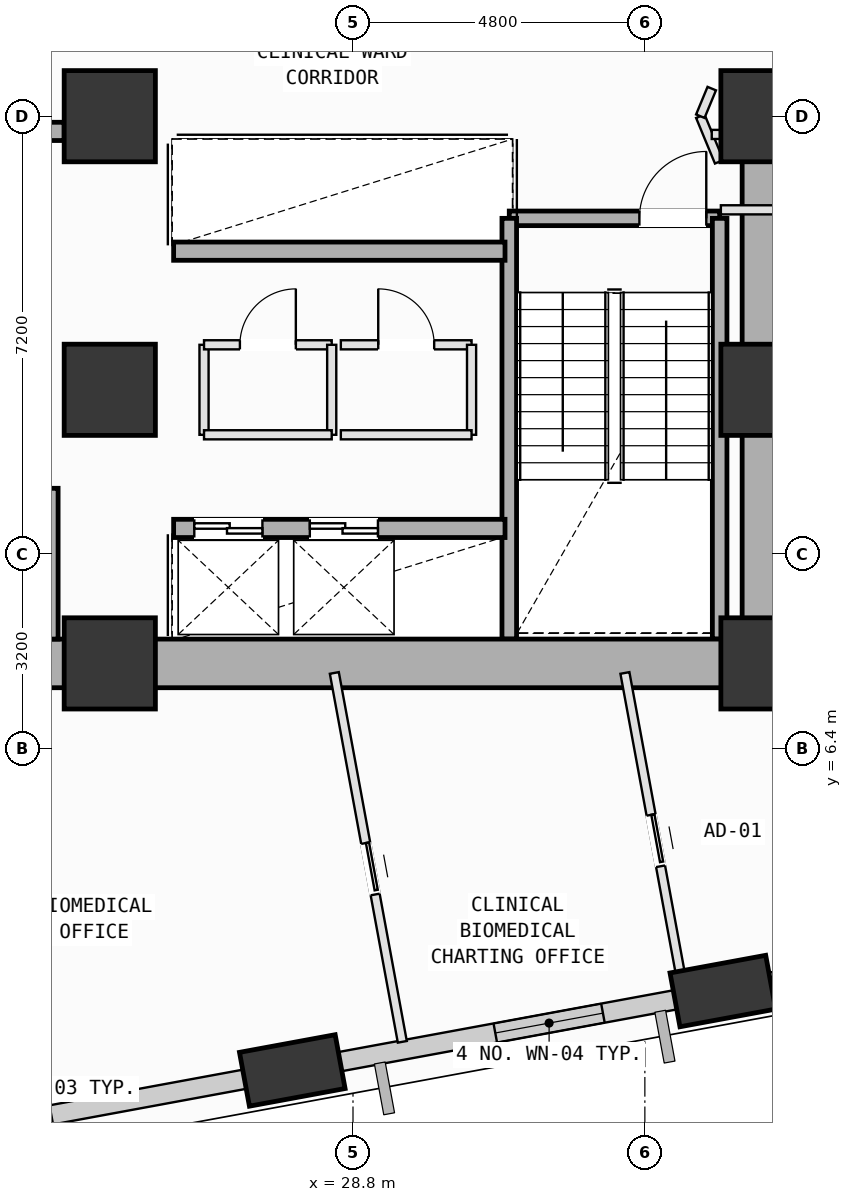
"""IFC4 building model, lengths in metres.
Left out: names, types, materials, properties, quantities, classifications, styles, units other than length and angle.
Written with IfcOpenShell. Run it as: python <this file> out.ifc"""

import sys

from ifc_helpers import new_model, si_unit, direction, frame, frame_2d, origin, origin_2d, place, context, subcontext, project, spatial, rectangle, extrude, element, fill, save


model = new_model("IFC4")
c1 = context("Model", 3, precision=1e-05, world=origin(), true_north=direction((0.0, 1.0)))
c2 = subcontext(c1, "Body", "Model", "MODEL_VIEW")
j1 = project(units=[si_unit("LENGTHUNIT", "METRE"), si_unit("PLANEANGLEUNIT", "RADIAN")], contexts=[c1])
p1 = place(None, origin())
s1 = spatial("IfcSite", under=j1, at=p1, CompositionType="ELEMENT")
p2 = place(p1, origin())
s2 = spatial("IfcBuilding", under=s1, at=p2, CompositionType="ELEMENT")
p3 = place(p2, frame((0.0, 0.0, 67.0)))
s3 = spatial("IfcBuildingStorey", under=s2, at=p3, CompositionType="ELEMENT", Elevation=67.0)
for number, where, z_axis, x_axis in (
    (1, (24.8, 7.8, 0.0), (0.0, 0.0, 1.0), (1.0, 0.0, 0.0)),
    (2, (24.8, 12.3, 0.0), (0.0, 0.0, 1.0), (1.0, 0.0, 0.0)),
    (3, (24.8, 16.8, 0.0), (0.0, 0.0, 1.0), (1.0, 0.0, 0.0)),
    (4, (35.6, 7.8, 0.0), (0.0, 0.0, 1.0), (1.0, 0.0, 0.0)),
    (5, (35.6, 12.3, 0.0), (0.0, 0.0, 1.0), (1.0, 0.0, 0.0)),
    (6, (35.6, 16.8, 0.0), (0.0, 0.0, 1.0), (1.0, 0.0, 0.0)),
):
    element("IfcColumn", number, at=place(p3, frame(where, z_axis=z_axis, x_axis=x_axis)), inside=s3, PredefinedType="COLUMN", context=c2, shape_type="SweptSolid", body=[
        extrude(rectangle(XDim=1.5, YDim=1.5, at=origin_2d()), origin(), (0.0, 0.0, 1.0), 4.0),
    ])
p4 = place(p3, frame((27.802, 1.105, 0.002), z_axis=(0.097912486594, -0.023095434454, 0.994927005301), x_axis=(0.0501328935, 0.998575865555, 0.018246471441)))
e7 = element("IfcColumn", 7, at=p4, inside=s3, PredefinedType="COLUMN", context=c2, shape_type="SweptSolid", body=[
    extrude(rectangle(XDim=1.6, YDim=0.9, at=origin_2d()), origin(), (0.0, 0.0, 1.0), 4.017),
])
p5 = place(p3, frame((34.882, 2.411, 0.002), z_axis=(0.092332756055, 0.006082526749, 0.995709628872), x_axis=(-0.244852017256, 0.969415188648, 0.016783374669)))
e8 = element("IfcColumn", 8, at=p5, inside=s3, PredefinedType="COLUMN", context=c2, shape_type="SweptSolid", body=[
    extrude(rectangle(XDim=1.6, YDim=0.9, at=origin_2d()), origin(), (0.0, 0.0, 1.0), 4.014),
])
p6 = place(p3, frame((27.391, 1.03, 0.0), z_axis=(0.0, 0.0, 1.0), x_axis=(-0.983411421396, -0.18138901915, 0.0)))
e9 = element("IfcWall", 9, at=p6, inside=s3, PredefinedType="SOLIDWALL", context=c2, shape_type="SweptSolid", body=[
    extrude(rectangle(XDim=6.006, YDim=0.32, at=frame_2d((3.003, 0.0))), origin(), (0.0, 0.0, 1.0), 3.165),
])
p7 = place(p6, frame((3.613, 0.0, 0.75)))
e10 = element("IfcOpeningElement", 10, at=p7, cuts=e9, PredefinedType="OPENING", context=c2, shape_type="SweptSolid", body=[
    extrude(rectangle(XDim=1.4, YDim=1.85, at=frame_2d((0.7, 0.925))), frame((0.0, 0.17, 0.0), z_axis=(0.0, -1.0, 0.0), x_axis=(1.0, 0.0, 0.0)), (0.0, 0.0, 1.0), 0.34),
])
p8 = place(p3, frame((34.466, 2.334, 0.0), z_axis=(0.0, 0.0, 1.0), x_axis=(-0.983412841191, -0.181381321478, 0.0)))
e11 = element("IfcWall", 11, at=p8, inside=s3, PredefinedType="SOLIDWALL", context=c2, shape_type="SweptSolid", body=[
    extrude(rectangle(XDim=5.99, YDim=0.32, at=frame_2d((2.995, 0.0))), origin(), (0.0, 0.0, 1.0), 3.165),
])
p9 = place(p8, frame((1.582, 0.0, 0.75)))
e12 = element("IfcOpeningElement", 12, at=p9, cuts=e11, PredefinedType="OPENING", context=c2, shape_type="SweptSolid", body=[
    extrude(rectangle(XDim=1.8, YDim=2.05, at=frame_2d((0.9, 1.025))), frame((0.0, 0.17, 0.0), z_axis=(0.0, -1.0, 0.0), x_axis=(1.0, 0.0, 0.0)), (0.0, 0.0, 1.0), 0.34),
])
p10 = place(p3, frame((41.547, 3.64, 0.0), z_axis=(0.0, 0.0, 1.0), x_axis=(-0.983417788938, -0.181354493742, 0.0)))
e13 = element("IfcWall", 13, at=p10, inside=s3, PredefinedType="SOLIDWALL", context=c2, shape_type="SweptSolid", body=[
    extrude(rectangle(XDim=5.985, YDim=0.32, at=frame_2d((2.993, 0.0))), origin(), (0.0, 0.0, 1.0), 3.165),
])
p11 = place(p10, frame((3.854, 0.0, 0.75)))
e14 = element("IfcOpeningElement", 14, at=p11, cuts=e13, PredefinedType="OPENING", context=c2, shape_type="SweptSolid", body=[
    extrude(rectangle(XDim=1.2, YDim=1.75, at=frame_2d((0.6, 0.875))), frame((0.0, 0.17, 0.0), z_axis=(0.0, -1.0, 0.0), x_axis=(1.0, 0.0, 0.0)), (0.0, 0.0, 1.0), 0.34),
])
p12 = place(p3, frame((31.37, 15.12, 0.0), z_axis=(0.0, 0.0, 1.0), x_axis=(1.0, 0.0, 0.0)))
e15 = element("IfcWall", 15, at=p12, inside=s3, PredefinedType="SOLIDWALL", context=c2, shape_type="SweptSolid", body=[
    extrude(rectangle(XDim=3.46, YDim=0.24, at=frame_2d((1.73, 0.0))), origin(), (0.0, 0.0, 1.0), 3.78),
])
p13 = place(p12, frame((2.14, 0.0, 0.0)))
e16 = element("IfcOpeningElement", 16, at=p13, cuts=e15, PredefinedType="OPENING", context=c2, shape_type="SweptSolid", body=[
    extrude(rectangle(XDim=1.1, YDim=2.15, at=frame_2d((0.55, 1.075))), frame((0.0, 0.13, 0.0), z_axis=(0.0, -1.0, 0.0), x_axis=(1.0, 0.0, 0.0)), (0.0, 0.0, 1.0), 0.26),
])
for number, where, z_axis, x_axis in (
    (17, (34.83, 15.12, 0.0), (0.0, 0.0, 1.0), (0.0, -1.0, 0.0)),
    (18, (31.37, 8.2, 0.0), (0.0, 0.0, 1.0), (0.0, 1.0, 0.0)),
):
    element("IfcWall", number, at=place(p3, frame(where, z_axis=z_axis, x_axis=x_axis)), inside=s3, PredefinedType="SOLIDWALL", context=c2, shape_type="SweptSolid", body=[
        extrude(rectangle(XDim=6.92, YDim=0.24, at=frame_2d((3.46, 0.0))), origin(), (0.0, 0.0, 1.0), 3.78),
    ])
for number, where, z_axis, x_axis in (
    (19, (14.0, 7.8, 0.0), (0.0, 0.0, 1.0), (1.0, 0.0, 0.0)),
    (20, (24.8, 7.8, 0.0), (0.0, 0.0, 1.0), (1.0, 0.0, 0.0)),
):
    element("IfcWall", number, at=place(p3, frame(where, z_axis=z_axis, x_axis=x_axis)), inside=s3, PredefinedType="SHEAR", context=c2, shape_type="SweptSolid", body=[
        extrude(rectangle(XDim=10.8, YDim=0.8, at=frame_2d((5.4, 0.0))), origin(), (0.0, 0.0, 1.0), 3.78),
    ])
p14 = place(p3, frame((35.6, 7.8, 0.0), z_axis=(0.0, 0.0, 1.0), x_axis=(0.0, 1.0, 0.0)))
e21 = element("IfcWall", 21, at=p14, inside=s3, PredefinedType="SHEAR", context=c2, shape_type="SweptSolid", body=[
    extrude(rectangle(XDim=9.0, YDim=0.8, at=frame_2d((4.5, 0.0))), origin(), (0.0, 0.0, 1.0), 3.78),
])
p15 = place(p3, frame((19.85, 16.55, 0.0), z_axis=(0.0, 0.0, 1.0), x_axis=(1.0, 0.0, 0.0)))
e22 = element("IfcWall", 22, at=p15, inside=s3, PredefinedType="SOLIDWALL", context=c2, shape_type="SweptSolid", body=[
    extrude(rectangle(XDim=4.2, YDim=0.3, at=frame_2d((2.1, 0.0))), origin(), (0.0, 0.0, 1.0), 3.78),
])
p16 = place(p15, frame((0.475, 0.0, 0.0)))
e23 = element("IfcOpeningElement", 23, at=p16, cuts=e22, PredefinedType="OPENING", context=c2, shape_type="SweptSolid", body=[
    extrude(rectangle(XDim=1.25, YDim=2.18, at=frame_2d((0.625, 1.09))), frame((0.0, 0.16, 0.0), z_axis=(0.0, -1.0, 0.0), x_axis=(1.0, 0.0, 0.0)), (0.0, 0.0, 1.0), 0.32),
])
p17 = place(p15, frame((2.49, 0.0, 0.0)))
e24 = element("IfcOpeningElement", 24, at=p17, cuts=e22, PredefinedType="OPENING", context=c2, shape_type="SweptSolid", body=[
    extrude(rectangle(XDim=1.02, YDim=2.12, at=frame_2d((0.51, 1.06))), frame((0.0, 0.16, 0.0), z_axis=(0.0, -1.0, 0.0), x_axis=(1.0, 0.0, 0.0)), (0.0, 0.0, 1.0), 0.32),
])
p18 = place(p3, frame((23.8, 8.2, 0.0), z_axis=(0.0, 0.0, 1.0), x_axis=(0.0, 1.0, 0.0)))
e25 = element("IfcWall", 25, at=p18, inside=s3, PredefinedType="SOLIDWALL", context=c2, shape_type="SweptSolid", body=[
    extrude(rectangle(XDim=2.48, YDim=0.3, at=frame_2d((1.24, 0.0))), origin(), (0.0, 0.0, 1.0), 3.78),
])
p19 = place(p3, frame((25.85, 10.02, 0.0), z_axis=(0.0, 0.0, 1.0), x_axis=(1.0, 0.0, 0.0)))
e26 = element("IfcWall", 26, at=p19, inside=s3, PredefinedType="SOLIDWALL", context=c2, shape_type="SweptSolid", body=[
    extrude(rectangle(XDim=5.45, YDim=0.3, at=frame_2d((2.725, 0.0))), origin(), (0.0, 0.0, 1.0), 3.78),
])
p20 = place(p19, frame((0.34, 0.0, 0.0)))
e27 = element("IfcOpeningElement", 27, at=p20, cuts=e26, PredefinedType="OPENING", context=c2, shape_type="SweptSolid", body=[
    extrude(rectangle(XDim=1.12, YDim=2.15, at=frame_2d((0.56, 1.075))), frame((0.0, 0.16, 0.0), z_axis=(0.0, -1.0, 0.0), x_axis=(1.0, 0.0, 0.0)), (0.0, 0.0, 1.0), 0.32),
])
p21 = place(p19, frame((2.24, 0.0, 0.0)))
e28 = element("IfcOpeningElement", 28, at=p21, cuts=e26, PredefinedType="OPENING", context=c2, shape_type="SweptSolid", body=[
    extrude(rectangle(XDim=1.12, YDim=2.15, at=frame_2d((0.56, 1.075))), frame((0.0, 0.16, 0.0), z_axis=(0.0, -1.0, 0.0), x_axis=(1.0, 0.0, 0.0)), (0.0, 0.0, 1.0), 0.32),
])
p22 = place(p3, frame((25.85, 14.58, 0.0), z_axis=(0.0, 0.0, 1.0), x_axis=(1.0, 0.0, 0.0)))
e29 = element("IfcWall", 29, at=p22, inside=s3, PredefinedType="SOLIDWALL", context=c2, shape_type="SweptSolid", body=[
    extrude(rectangle(XDim=5.45, YDim=0.3, at=frame_2d((2.725, 0.0))), origin(), (0.0, 0.0, 1.0), 3.78),
])
p23 = place(p3, frame((26.35, 11.56, 0.0), z_axis=(0.0, 0.0, 1.0), x_axis=(0.0, 1.0, 0.0)))
e30 = element("IfcWall", 30, at=p23, inside=s3, PredefinedType="PARTITIONING", context=c2, shape_type="SweptSolid", body=[
    extrude(rectangle(XDim=1.48, YDim=0.15, at=frame_2d((0.74, 0.0))), origin(), (0.0, 0.0, 1.0), 3.78),
])
p24 = place(p3, frame((26.35, 13.04, 0.0), z_axis=(0.0, 0.0, 1.0), x_axis=(1.0, 0.0, 0.0)))
e31 = element("IfcWall", 31, at=p24, inside=s3, PredefinedType="PARTITIONING", context=c2, shape_type="SweptSolid", body=[
    extrude(rectangle(XDim=2.1, YDim=0.15, at=frame_2d((1.05, 0.0))), origin(), (0.0, 0.0, 1.0), 3.78),
])
p25 = place(p24, frame((0.59, 0.0, 0.0)))
e32 = element("IfcOpeningElement", 32, at=p25, cuts=e31, PredefinedType="OPENING", context=c2, shape_type="SweptSolid", body=[
    extrude(rectangle(XDim=0.92, YDim=2.1, at=frame_2d((0.46, 1.05))), frame((0.0, 0.085, 0.0), z_axis=(0.0, -1.0, 0.0), x_axis=(1.0, 0.0, 0.0)), (0.0, 0.0, 1.0), 0.17),
])
p26 = place(p3, frame((28.45, 13.04, 0.0), z_axis=(0.0, 0.0, 1.0), x_axis=(0.0, -1.0, 0.0)))
e33 = element("IfcWall", 33, at=p26, inside=s3, PredefinedType="PARTITIONING", context=c2, shape_type="SweptSolid", body=[
    extrude(rectangle(XDim=1.48, YDim=0.15, at=frame_2d((0.74, 0.0))), origin(), (0.0, 0.0, 1.0), 3.78),
])
p27 = place(p3, frame((28.45, 11.56, 0.0), z_axis=(0.0, 0.0, 1.0), x_axis=(-1.0, 0.0, 0.0)))
e34 = element("IfcWall", 34, at=p27, inside=s3, PredefinedType="PARTITIONING", context=c2, shape_type="SweptSolid", body=[
    extrude(rectangle(XDim=2.1, YDim=0.15, at=frame_2d((1.05, 0.0))), origin(), (0.0, 0.0, 1.0), 3.78),
])
p28 = place(p3, frame((28.6, 13.04, 0.0), z_axis=(0.0, 0.0, 1.0), x_axis=(1.0, 0.0, 0.0)))
e35 = element("IfcWall", 35, at=p28, inside=s3, PredefinedType="PARTITIONING", context=c2, shape_type="SweptSolid", body=[
    extrude(rectangle(XDim=2.15, YDim=0.15, at=frame_2d((1.075, 0.0))), origin(), (0.0, 0.0, 1.0), 3.78),
])
p29 = place(p28, frame((0.615, 0.0, 0.0)))
e36 = element("IfcOpeningElement", 36, at=p29, cuts=e35, PredefinedType="OPENING", context=c2, shape_type="SweptSolid", body=[
    extrude(rectangle(XDim=0.92, YDim=2.1, at=frame_2d((0.46, 1.05))), frame((0.0, 0.085, 0.0), z_axis=(0.0, -1.0, 0.0), x_axis=(1.0, 0.0, 0.0)), (0.0, 0.0, 1.0), 0.17),
])
p30 = place(p3, frame((30.75, 13.04, 0.0), z_axis=(0.0, 0.0, 1.0), x_axis=(0.0, -1.0, 0.0)))
e37 = element("IfcWall", 37, at=p30, inside=s3, PredefinedType="PARTITIONING", context=c2, shape_type="SweptSolid", body=[
    extrude(rectangle(XDim=1.48, YDim=0.15, at=frame_2d((0.74, 0.0))), origin(), (0.0, 0.0, 1.0), 3.78),
])
p31 = place(p3, frame((30.75, 11.56, 0.0), z_axis=(0.0, 0.0, 1.0), x_axis=(-1.0, 0.0, 0.0)))
e38 = element("IfcWall", 38, at=p31, inside=s3, PredefinedType="PARTITIONING", context=c2, shape_type="SweptSolid", body=[
    extrude(rectangle(XDim=2.15, YDim=0.15, at=frame_2d((1.075, 0.0))), origin(), (0.0, 0.0, 1.0), 3.78),
])
p32 = place(p3, frame((28.618, 1.022, 0.0), z_axis=(0.0, 0.0, 1.0), x_axis=(-0.983343757315, -0.18175548121, 0.0)))
e39 = element("IfcWall", 39, at=p32, inside=s3, PredefinedType="PARTITIONING", context=c2, shape_type="SweptSolid", body=[
    extrude(rectangle(XDim=1.205, YDim=0.15, at=frame_2d((0.603, 0.0))), origin(), (0.0, 0.0, 1.0), 3.165),
])
p33 = place(p3, frame((28.493, 7.643, 0.0), z_axis=(0.0, 0.0, 1.0), x_axis=(0.181246028558, -0.983437785085, 0.0)))
e40 = element("IfcWall", 40, at=p33, inside=s3, PredefinedType="PARTITIONING", context=c2, shape_type="SweptSolid", body=[
    extrude(rectangle(XDim=6.169, YDim=0.15, at=frame_2d((3.085, 0.0))), origin(), (0.0, 0.0, 1.0), 3.78),
])
p34 = place(p33, frame((2.845, 0.0, 0.0)))
e41 = element("IfcOpeningElement", 41, at=p34, cuts=e40, PredefinedType="OPENING", context=c2, shape_type="SweptSolid", body=[
    extrude(rectangle(XDim=0.86, YDim=2.06, at=frame_2d((0.43, 1.03))), frame((0.0, 0.085, 0.0), z_axis=(0.0, -1.0, 0.0), x_axis=(1.0, 0.0, 0.0)), (0.0, 0.0, 1.0), 0.17),
])
p35 = place(p3, frame((33.272, 7.643, 0.0), z_axis=(0.0, 0.0, 1.0), x_axis=(0.181243297431, -0.983438288423, 0.0)))
e42 = element("IfcWall", 42, at=p35, inside=s3, PredefinedType="PARTITIONING", context=c2, shape_type="SweptSolid", body=[
    extrude(rectangle(XDim=5.302, YDim=0.15, at=frame_2d((2.651, 0.0))), origin(), (0.0, 0.0, 1.0), 3.78),
])
p36 = place(p35, frame((2.373, 0.0, 0.0)))
e43 = element("IfcOpeningElement", 43, at=p36, cuts=e42, PredefinedType="OPENING", context=c2, shape_type="SweptSolid", body=[
    extrude(rectangle(XDim=0.86, YDim=2.06, at=frame_2d((0.43, 1.03))), frame((0.0, 0.085, 0.0), z_axis=(0.0, -1.0, 0.0), x_axis=(1.0, 0.0, 0.0)), (0.0, 0.0, 1.0), 0.17),
])
p37 = place(p3, frame((36.15, 15.26, 0.0), z_axis=(0.0, 0.0, 1.0), x_axis=(-1.0, 0.0, 0.0)))
e44 = element("IfcWall", 44, at=p37, inside=s3, PredefinedType="PARTITIONING", context=c2, shape_type="SweptSolid", body=[
    extrude(rectangle(XDim=1.3, YDim=0.15, at=frame_2d((0.65, 0.0))), origin(), (0.0, 0.0, 1.0), 3.78),
])
p38 = place(p3, frame((34.822, 16.05, 0.0), z_axis=(0.0, 0.0, 1.0), x_axis=(-0.382050639738, 0.924141389981, 0.0)))
e45 = element("IfcWall", 45, at=p38, inside=s3, PredefinedType="PARTITIONING", context=c2, shape_type="SweptSolid", body=[
    extrude(rectangle(XDim=0.812, YDim=0.15, at=frame_2d((0.406, 0.0))), origin(), (0.0, 0.0, 1.0), 3.78),
])
p39 = place(p3, frame((34.512, 16.8, 0.0), z_axis=(0.0, 0.0, 1.0), x_axis=(0.382673670509, 0.923883575944, 0.0)))
e46 = element("IfcWall", 46, at=p39, inside=s3, PredefinedType="PARTITIONING", context=c2, shape_type="SweptSolid", body=[
    extrude(rectangle(XDim=0.491, YDim=0.15, at=frame_2d((0.246, 0.0))), origin(), (0.0, 0.0, 1.0), 3.78),
])
p40 = place(p3, frame((34.7, 16.5, 0.0), z_axis=(0.0, 0.0, 1.0), x_axis=(1.0, 0.0, 0.0)))
e47 = element("IfcWall", 47, at=p40, inside=s3, PredefinedType="PARTITIONING", context=c2, shape_type="SweptSolid", body=[
    extrude(rectangle(XDim=1.717, YDim=0.15, at=frame_2d((0.858, 0.0))), origin(), (0.0, 0.0, 1.0), 2.865),
])
p41 = place(p3, frame((35.703, 2.329, 0.0), z_axis=(0.0, 0.0, 1.0), x_axis=(-0.983292662079, -0.182031702461, 0.0)))
e48 = element("IfcWall", 48, at=p41, inside=s3, PredefinedType="PARTITIONING", context=c2, shape_type="SweptSolid", body=[
    extrude(rectangle(XDim=1.215, YDim=0.15, at=frame_2d((0.607, 0.0))), origin(), (0.0, 0.0, 1.0), 3.165),
])
p42 = place(p3, frame((35.6, 7.5, 0.0), z_axis=(0.0, 0.0, 1.0), x_axis=(1.0, 0.0, 0.0)))
e49 = element("IfcWall", 49, at=p42, inside=s3, PredefinedType="PARTITIONING", context=c2, shape_type="SweptSolid", body=[
    extrude(rectangle(XDim=0.55, YDim=0.15, at=frame_2d((0.275, 0.0))), origin(), (0.0, 0.0, 1.0), 3.78),
])
p43 = place(p9, origin())
e50 = element("IfcWindow", 50, at=p43, inside=s3, PartitioningType="SINGLE_PANEL", PredefinedType="WINDOW", context=c2, shape_type="SweptSolid", body=[
    extrude(rectangle(XDim=1.8, YDim=2.05, at=frame_2d((0.9, 1.025))), frame((0.0, 0.03, 0.0), z_axis=(0.0, -1.0, 0.0), x_axis=(1.0, 0.0, 0.0)), (0.0, 0.0, 1.0), 0.06),
])
fill(e12, e50)
p44 = place(p13, origin())
e51 = element("IfcDoor", 51, at=p44, inside=s3, OperationType="SINGLE_SWING_RIGHT", PredefinedType="DOOR", context=c2, shape_type="SweptSolid", body=[
    extrude(rectangle(XDim=1.1, YDim=2.15, at=frame_2d((0.55, 1.075))), frame((0.0, 0.025, 0.0), z_axis=(0.0, -1.0, 0.0), x_axis=(1.0, 0.0, 0.0)), (0.0, 0.0, 1.0), 0.05),
])
fill(e16, e51)
p45 = place(p20, origin())
e52 = element("IfcDoor", 52, at=p45, inside=s3, OperationType="DOUBLE_DOOR_SLIDING", PredefinedType="DOOR", context=c2, shape_type="SweptSolid", body=[
    extrude(rectangle(XDim=1.12, YDim=2.15, at=frame_2d((0.56, 1.075))), frame((0.0, 0.025, 0.0), z_axis=(0.0, -1.0, 0.0), x_axis=(1.0, 0.0, 0.0)), (0.0, 0.0, 1.0), 0.05),
])
fill(e27, e52)
p46 = place(p21, origin())
e53 = element("IfcDoor", 53, at=p46, inside=s3, OperationType="DOUBLE_DOOR_SLIDING", PredefinedType="DOOR", context=c2, shape_type="SweptSolid", body=[
    extrude(rectangle(XDim=1.12, YDim=2.15, at=frame_2d((0.56, 1.075))), frame((0.0, 0.025, 0.0), z_axis=(0.0, -1.0, 0.0), x_axis=(1.0, 0.0, 0.0)), (0.0, 0.0, 1.0), 0.05),
])
fill(e28, e53)
p47 = place(p25, origin())
e54 = element("IfcDoor", 54, at=p47, inside=s3, OperationType="SINGLE_SWING_RIGHT", PredefinedType="DOOR", context=c2, shape_type="SweptSolid", body=[
    extrude(rectangle(XDim=0.92, YDim=2.1, at=frame_2d((0.46, 1.05))), frame((0.0, 0.025, 0.0), z_axis=(0.0, -1.0, 0.0), x_axis=(1.0, 0.0, 0.0)), (0.0, 0.0, 1.0), 0.05),
])
fill(e32, e54)
p48 = place(p29, origin())
e55 = element("IfcDoor", 55, at=p48, inside=s3, OperationType="SINGLE_SWING_LEFT", PredefinedType="DOOR", context=c2, shape_type="SweptSolid", body=[
    extrude(rectangle(XDim=0.92, YDim=2.1, at=frame_2d((0.46, 1.05))), frame((0.0, 0.025, 0.0), z_axis=(0.0, -1.0, 0.0), x_axis=(1.0, 0.0, 0.0)), (0.0, 0.0, 1.0), 0.05),
])
fill(e36, e55)
p49 = place(p36, origin())
e56 = element("IfcDoor", 56, at=p49, inside=s3, OperationType="SLIDING_TO_LEFT", PredefinedType="DOOR", context=c2, shape_type="SweptSolid", body=[
    extrude(rectangle(XDim=0.86, YDim=2.06, at=frame_2d((0.43, 1.03))), frame((0.0, 0.025, 0.0), z_axis=(0.0, -1.0, 0.0), x_axis=(1.0, 0.0, 0.0)), (0.0, 0.0, 1.0), 0.05),
])
fill(e43, e56)
p50 = place(p34, origin())
e57 = element("IfcDoor", 57, at=p50, inside=s3, OperationType="SLIDING_TO_LEFT", PredefinedType="DOOR", context=c2, shape_type="SweptSolid", body=[
    extrude(rectangle(XDim=0.86, YDim=2.06, at=frame_2d((0.43, 1.03))), frame((0.0, 0.025, 0.0), z_axis=(0.0, -1.0, 0.0), x_axis=(1.0, 0.0, 0.0)), (0.0, 0.0, 1.0), 0.05),
])
fill(e41, e57)
save(model, sys.argv[1])
